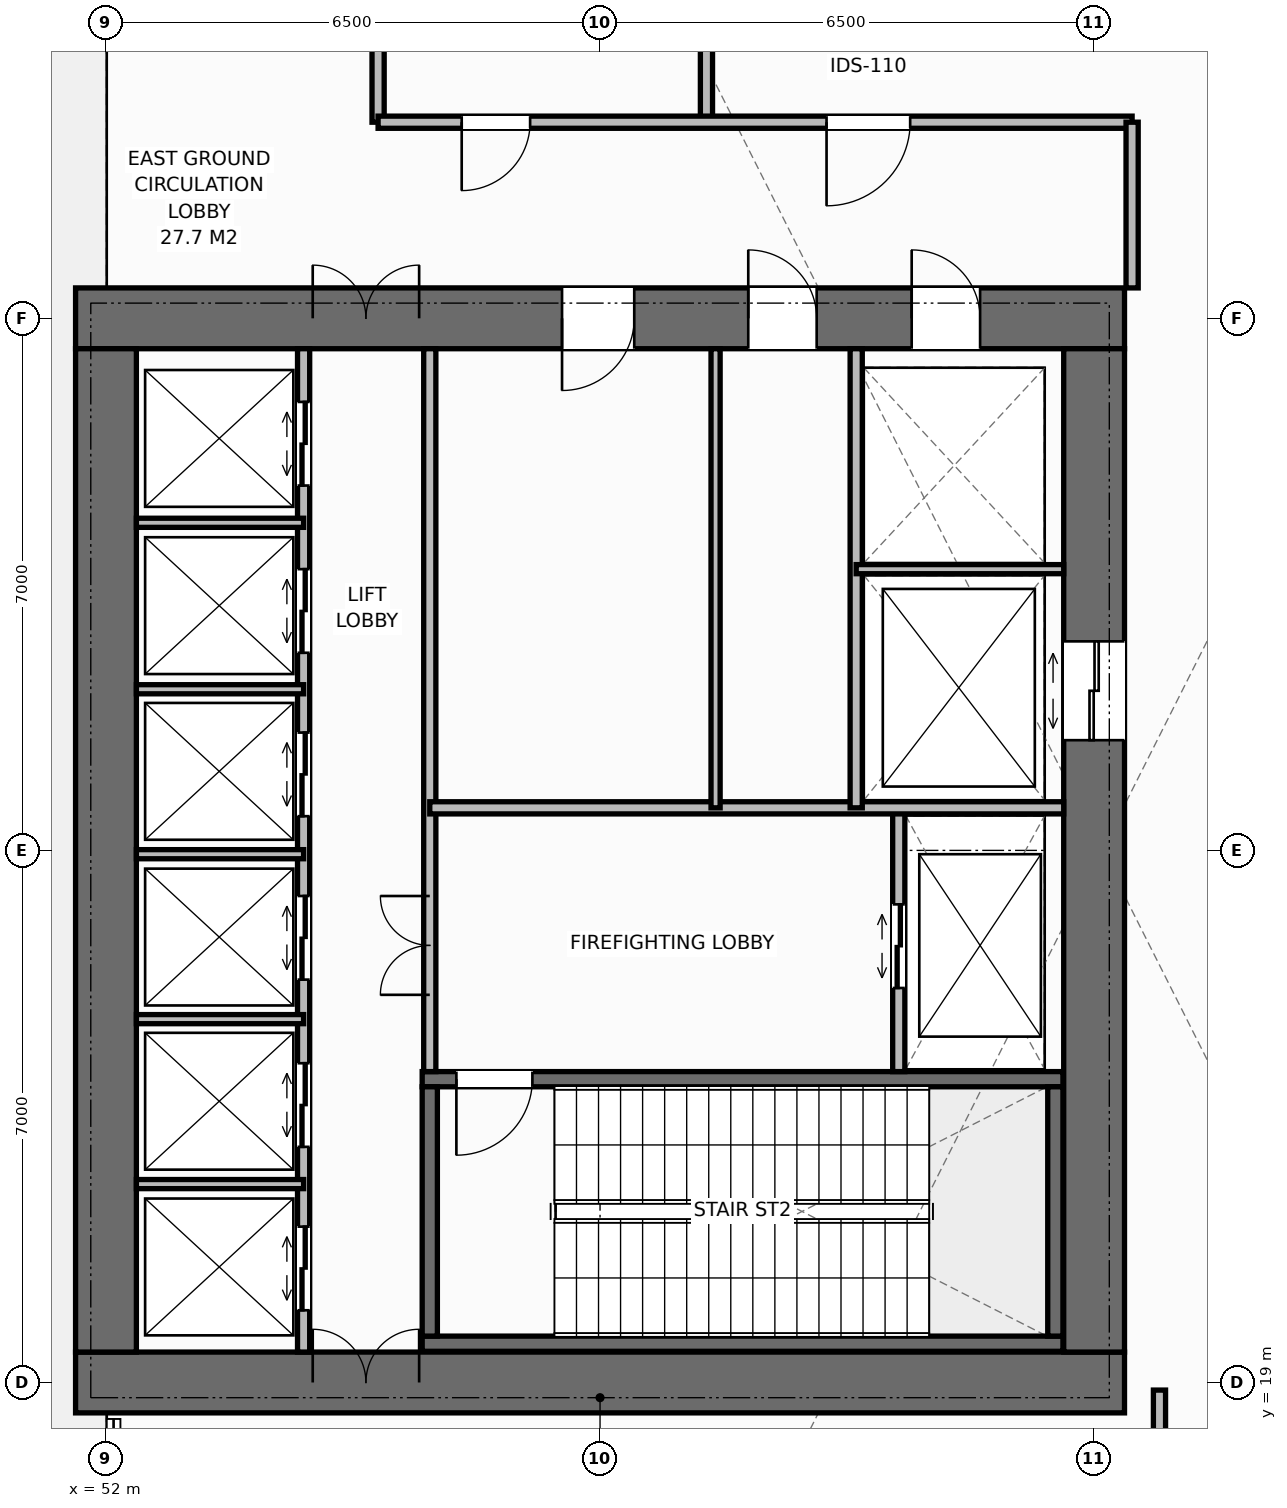
"""IFC4 building model, lengths in metres.
Left out: names, types, materials, properties, quantities, classifications, styles, units other than length and angle.
Written with IfcOpenShell. Run it as: python <this file> out.ifc"""

import sys

from ifc_helpers import new_model, si_unit, direction, frame, frame_2d, origin, place, context, subcontext, project, spatial, rectangle, extrude, element, fill, save


model = new_model("IFC4")
c1 = context("Model", 3, precision=1e-05, world=origin(), true_north=direction((0.0, 1.0)))
c2 = subcontext(c1, "Body", "Model", "MODEL_VIEW")
j1 = project(units=[si_unit("LENGTHUNIT", "METRE"), si_unit("PLANEANGLEUNIT", "RADIAN")], contexts=[c1])
p1 = place(None, origin())
s1 = spatial("IfcSite", under=j1, at=p1, CompositionType="ELEMENT")
p2 = place(p1, origin())
s2 = spatial("IfcBuilding", under=s1, at=p2, CompositionType="ELEMENT")
p3 = place(p2, origin())
s3 = spatial("IfcBuildingStorey", under=s2, at=p3, CompositionType="ELEMENT", Elevation=0.0)
p4 = place(p3, frame((51.6, 19.0, 0.0), z_axis=(0.0, 0.0, 1.0), x_axis=(1.0, 0.0, 0.0)))
e1 = element("IfcWall", 1, at=p4, inside=s3, PredefinedType="SHEAR", context=c2, shape_type="SweptSolid", body=[
    extrude(rectangle(XDim=13.8, YDim=0.8, at=frame_2d((6.9, 0.0))), origin(), (0.0, 0.0, 1.0), 6.0),
])
p5 = place(p4, frame((3.12, 0.0, 0.0)))
e2 = element("IfcOpeningElement", 2, at=p5, cuts=e1, PredefinedType="OPENING", context=c2, shape_type="SweptSolid", body=[
    extrude(rectangle(XDim=1.4, YDim=2.2, at=frame_2d((0.7, 1.1))), frame((0.0, 0.41, 0.0), z_axis=(0.0, -1.0, 0.0), x_axis=(1.0, 0.0, 0.0)), (0.0, 0.0, 1.0), 0.82),
])
p6 = place(p3, frame((51.6, 33.0, 0.0), z_axis=(0.0, 0.0, 1.0), x_axis=(1.0, 0.0, 0.0)))
e3 = element("IfcWall", 3, at=p6, inside=s3, PredefinedType="SHEAR", context=c2, shape_type="SweptSolid", body=[
    extrude(rectangle(XDim=13.8, YDim=0.8, at=frame_2d((6.9, 0.0))), origin(), (0.0, 0.0, 1.0), 6.0),
])
p7 = place(p6, frame((3.12, 0.0, 0.0)))
e4 = element("IfcOpeningElement", 4, at=p7, cuts=e3, PredefinedType="OPENING", context=c2, shape_type="SweptSolid", body=[
    extrude(rectangle(XDim=1.4, YDim=2.2, at=frame_2d((0.7, 1.1))), frame((0.0, 0.41, 0.0), z_axis=(0.0, -1.0, 0.0), x_axis=(1.0, 0.0, 0.0)), (0.0, 0.0, 1.0), 0.82),
])
p8 = place(p6, frame((11.0, 0.0, 0.0)))
e5 = element("IfcOpeningElement", 5, at=p8, cuts=e3, PredefinedType="OPENING", context=c2, shape_type="SweptSolid", body=[
    extrude(rectangle(XDim=0.9, YDim=2.15, at=frame_2d((0.45, 1.075))), frame((0.0, 0.41, 0.0), z_axis=(0.0, -1.0, 0.0), x_axis=(1.0, 0.0, 0.0)), (0.0, 0.0, 1.0), 0.82),
])
p9 = place(p6, frame((6.4, 0.0, 0.0)))
e6 = element("IfcOpeningElement", 6, at=p9, cuts=e3, PredefinedType="OPENING", context=c2, shape_type="SweptSolid", body=[
    extrude(rectangle(XDim=0.95, YDim=2.15, at=frame_2d((0.475, 1.075))), frame((0.0, 0.41, 0.0), z_axis=(0.0, -1.0, 0.0), x_axis=(1.0, 0.0, 0.0)), (0.0, 0.0, 1.0), 0.82),
])
p10 = place(p6, frame((8.85, 0.0, 0.0)))
e7 = element("IfcOpeningElement", 7, at=p10, cuts=e3, PredefinedType="OPENING", context=c2, shape_type="SweptSolid", body=[
    extrude(rectangle(XDim=0.9, YDim=2.15, at=frame_2d((0.45, 1.075))), frame((0.0, 0.41, 0.0), z_axis=(0.0, -1.0, 0.0), x_axis=(1.0, 0.0, 0.0)), (0.0, 0.0, 1.0), 0.82),
])
p11 = place(p3, frame((52.0, 19.4, 0.0), z_axis=(0.0, 0.0, 1.0), x_axis=(0.0, 1.0, 0.0)))
e8 = element("IfcWall", 8, at=p11, inside=s3, PredefinedType="SHEAR", context=c2, shape_type="SweptSolid", body=[
    extrude(rectangle(XDim=13.2, YDim=0.8, at=frame_2d((6.6, 0.0))), origin(), (0.0, 0.0, 1.0), 6.0),
])
p12 = place(p3, frame((65.0, 19.4, 0.0), z_axis=(0.0, 0.0, 1.0), x_axis=(0.0, 1.0, 0.0)))
e9 = element("IfcWall", 9, at=p12, inside=s3, PredefinedType="SHEAR", context=c2, shape_type="SweptSolid", body=[
    extrude(rectangle(XDim=13.2, YDim=0.8, at=frame_2d((6.6, 0.0))), origin(), (0.0, 0.0, 1.0), 6.0),
])
p13 = place(p12, frame((8.05, 0.0, 0.0)))
e10 = element("IfcOpeningElement", 10, at=p13, cuts=e9, PredefinedType="OPENING", context=c2, shape_type="SweptSolid", body=[
    extrude(rectangle(XDim=1.3, YDim=2.2, at=frame_2d((0.65, 1.1))), frame((0.0, 0.41, 0.0), z_axis=(0.0, -1.0, 0.0), x_axis=(1.0, 0.0, 0.0)), (0.0, 0.0, 1.0), 0.82),
])
p14 = place(p3, frame((56.16, 19.51, 0.0), z_axis=(0.0, 0.0, 1.0), x_axis=(1.0, 0.0, 0.0)))
e11 = element("IfcWall", 11, at=p14, inside=s3, PredefinedType="SHEAR", context=c2, shape_type="SweptSolid", body=[
    extrude(rectangle(XDim=8.43, YDim=0.2, at=frame_2d((4.215, 0.0))), origin(), (0.0, 0.0, 1.0), 6.0),
])
p15 = place(p3, frame((56.16, 22.99, 0.0), z_axis=(0.0, 0.0, 1.0), x_axis=(1.0, 0.0, 0.0)))
e12 = element("IfcWall", 12, at=p15, inside=s3, PredefinedType="SHEAR", context=c2, shape_type="SweptSolid", body=[
    extrude(rectangle(XDim=8.43, YDim=0.2, at=frame_2d((4.215, 0.0))), origin(), (0.0, 0.0, 1.0), 6.0),
])
p16 = place(p15, frame((0.45, 0.0, 0.0)))
e13 = element("IfcOpeningElement", 13, at=p16, cuts=e12, PredefinedType="OPENING", context=c2, shape_type="SweptSolid", body=[
    extrude(rectangle(XDim=1.0, YDim=2.15, at=frame_2d((0.5, 1.075))), frame((0.0, 0.11, 0.0), z_axis=(0.0, -1.0, 0.0), x_axis=(1.0, 0.0, 0.0)), (0.0, 0.0, 1.0), 0.22),
])
for number, where, z_axis, x_axis in (
    (14, (56.26, 19.61, 0.0), (0.0, 0.0, 1.0), (0.0, 1.0, 0.0)),
    (15, (64.49, 19.61, 0.0), (0.0, 0.0, 1.0), (0.0, 1.0, 0.0)),
):
    element("IfcWall", number, at=place(p3, frame(where, z_axis=z_axis, x_axis=x_axis)), inside=s3, PredefinedType="SHEAR", context=c2, shape_type="SweptSolid", body=[
        extrude(rectangle(XDim=3.28, YDim=0.2, at=frame_2d((1.64, 0.0))), origin(), (0.0, 0.0, 1.0), 6.0),
    ])
p17 = place(p3, frame((54.6, 19.4, 0.0), z_axis=(0.0, 0.0, 1.0), x_axis=(0.0, 1.0, 0.0)))
e16 = element("IfcWall", 16, at=p17, inside=s3, PredefinedType="STANDARD", context=c2, shape_type="SweptSolid", body=[
    extrude(rectangle(XDim=13.2, YDim=0.16, at=frame_2d((6.6, 0.0))), origin(), (0.0, 0.0, 1.0), 5.72),
])
p18 = place(p17, frame((0.55, 0.0, 0.0)))
e17 = element("IfcOpeningElement", 17, at=p18, cuts=e16, PredefinedType="OPENING", context=c2, shape_type="SweptSolid", body=[
    extrude(rectangle(XDim=1.1, YDim=2.2, at=frame_2d((0.55, 1.1))), frame((0.0, 0.09, 0.0), z_axis=(0.0, -1.0, 0.0), x_axis=(1.0, 0.0, 0.0)), (0.0, 0.0, 1.0), 0.18),
])
p19 = place(p17, frame((2.7, 0.0, 0.0)))
e18 = element("IfcOpeningElement", 18, at=p19, cuts=e16, PredefinedType="OPENING", context=c2, shape_type="SweptSolid", body=[
    extrude(rectangle(XDim=1.1, YDim=2.2, at=frame_2d((0.55, 1.1))), frame((0.0, 0.09, 0.0), z_axis=(0.0, -1.0, 0.0), x_axis=(1.0, 0.0, 0.0)), (0.0, 0.0, 1.0), 0.18),
])
p20 = place(p17, frame((4.9, 0.0, 0.0)))
e19 = element("IfcOpeningElement", 19, at=p20, cuts=e16, PredefinedType="OPENING", context=c2, shape_type="SweptSolid", body=[
    extrude(rectangle(XDim=1.1, YDim=2.2, at=frame_2d((0.55, 1.1))), frame((0.0, 0.09, 0.0), z_axis=(0.0, -1.0, 0.0), x_axis=(1.0, 0.0, 0.0)), (0.0, 0.0, 1.0), 0.18),
])
p21 = place(p17, frame((7.05, 0.0, 0.0)))
e20 = element("IfcOpeningElement", 20, at=p21, cuts=e16, PredefinedType="OPENING", context=c2, shape_type="SweptSolid", body=[
    extrude(rectangle(XDim=1.1, YDim=2.2, at=frame_2d((0.55, 1.1))), frame((0.0, 0.09, 0.0), z_axis=(0.0, -1.0, 0.0), x_axis=(1.0, 0.0, 0.0)), (0.0, 0.0, 1.0), 0.18),
])
p22 = place(p17, frame((9.2, 0.0, 0.0)))
e21 = element("IfcOpeningElement", 21, at=p22, cuts=e16, PredefinedType="OPENING", context=c2, shape_type="SweptSolid", body=[
    extrude(rectangle(XDim=1.1, YDim=2.2, at=frame_2d((0.55, 1.1))), frame((0.0, 0.09, 0.0), z_axis=(0.0, -1.0, 0.0), x_axis=(1.0, 0.0, 0.0)), (0.0, 0.0, 1.0), 0.18),
])
p23 = place(p17, frame((11.4, 0.0, 0.0)))
e22 = element("IfcOpeningElement", 22, at=p23, cuts=e16, PredefinedType="OPENING", context=c2, shape_type="SweptSolid", body=[
    extrude(rectangle(XDim=1.1, YDim=2.2, at=frame_2d((0.55, 1.1))), frame((0.0, 0.09, 0.0), z_axis=(0.0, -1.0, 0.0), x_axis=(1.0, 0.0, 0.0)), (0.0, 0.0, 1.0), 0.18),
])
p24 = place(p3, frame((56.26, 23.09, 0.0), z_axis=(0.0, 0.0, 1.0), x_axis=(0.0, 1.0, 0.0)))
e23 = element("IfcWall", 23, at=p24, inside=s3, PredefinedType="STANDARD", context=c2, shape_type="SweptSolid", body=[
    extrude(rectangle(XDim=9.51, YDim=0.16, at=frame_2d((4.755, 0.0))), origin(), (0.0, 0.0, 1.0), 5.72),
])
p25 = place(p24, frame((1.01, 0.0, 0.0)))
e24 = element("IfcOpeningElement", 24, at=p25, cuts=e23, PredefinedType="OPENING", context=c2, shape_type="SweptSolid", body=[
    extrude(rectangle(XDim=1.3, YDim=2.2, at=frame_2d((0.65, 1.1))), frame((0.0, 0.09, 0.0), z_axis=(0.0, -1.0, 0.0), x_axis=(1.0, 0.0, 0.0)), (0.0, 0.0, 1.0), 0.18),
])
for number, where, z_axis, x_axis in (
    (25, (52.4, 21.61, 0.0), (0.0, 0.0, 1.0), (1.0, 0.0, 0.0)),
    (26, (52.4, 23.78, 0.0), (0.0, 0.0, 1.0), (1.0, 0.0, 0.0)),
    (27, (52.4, 25.95, 0.0), (0.0, 0.0, 1.0), (1.0, 0.0, 0.0)),
    (28, (52.4, 28.12, 0.0), (0.0, 0.0, 1.0), (1.0, 0.0, 0.0)),
    (29, (52.4, 30.31, 0.0), (0.0, 0.0, 1.0), (1.0, 0.0, 0.0)),
):
    element("IfcWall", number, at=place(p3, frame(where, z_axis=z_axis, x_axis=x_axis)), inside=s3, PredefinedType="PARTITIONING", context=c2, shape_type="SweptSolid", body=[
        extrude(rectangle(XDim=2.2, YDim=0.12, at=frame_2d((1.1, 0.0))), origin(), (0.0, 0.0, 1.0), 5.72),
    ])
p26 = place(p3, frame((62.43, 23.09, 0.0), z_axis=(0.0, 0.0, 1.0), x_axis=(0.0, 1.0, 0.0)))
e30 = element("IfcWall", 30, at=p26, inside=s3, PredefinedType="STANDARD", context=c2, shape_type="SweptSolid", body=[
    extrude(rectangle(XDim=3.47, YDim=0.16, at=frame_2d((1.735, 0.0))), origin(), (0.0, 0.0, 1.0), 5.72),
])
p27 = place(p26, frame((1.1, 0.0, 0.0)))
e31 = element("IfcOpeningElement", 31, at=p27, cuts=e30, PredefinedType="OPENING", context=c2, shape_type="SweptSolid", body=[
    extrude(rectangle(XDim=1.1, YDim=2.2, at=frame_2d((0.55, 1.1))), frame((0.0, 0.09, 0.0), z_axis=(0.0, -1.0, 0.0), x_axis=(1.0, 0.0, 0.0)), (0.0, 0.0, 1.0), 0.18),
])
p28 = place(p3, frame((56.26, 26.56, 0.0), z_axis=(0.0, 0.0, 1.0), x_axis=(1.0, 0.0, 0.0)))
e32 = element("IfcWall", 32, at=p28, inside=s3, PredefinedType="STANDARD", context=c2, shape_type="SweptSolid", body=[
    extrude(rectangle(XDim=8.34, YDim=0.16, at=frame_2d((4.17, 0.0))), origin(), (0.0, 0.0, 1.0), 5.72),
])
p29 = place(p3, frame((61.87, 26.56, 0.0), z_axis=(0.0, 0.0, 1.0), x_axis=(0.0, 1.0, 0.0)))
e33 = element("IfcWall", 33, at=p29, inside=s3, PredefinedType="STANDARD", context=c2, shape_type="SweptSolid", body=[
    extrude(rectangle(XDim=6.04, YDim=0.16, at=frame_2d((3.02, 0.0))), origin(), (0.0, 0.0, 1.0), 5.72),
])
p30 = place(p3, frame((61.87, 29.7, 0.0), z_axis=(0.0, 0.0, 1.0), x_axis=(1.0, 0.0, 0.0)))
e34 = element("IfcWall", 34, at=p30, inside=s3, PredefinedType="PARTITIONING", context=c2, shape_type="SweptSolid", body=[
    extrude(rectangle(XDim=2.73, YDim=0.12, at=frame_2d((1.365, 0.0))), origin(), (0.0, 0.0, 1.0), 5.72),
])
p31 = place(p3, frame((60.02, 26.56, 0.0), z_axis=(0.0, 0.0, 1.0), x_axis=(0.0, 1.0, 0.0)))
e35 = element("IfcWall", 35, at=p31, inside=s3, PredefinedType="PARTITIONING", context=c2, shape_type="SweptSolid", body=[
    extrude(rectangle(XDim=6.04, YDim=0.12, at=frame_2d((3.02, 0.0))), origin(), (0.0, 0.0, 1.0), 5.72),
])
for number, where, z_axis, x_axis in (
    (36, (55.58, 35.58, 0.0), (0.0, 0.0, 1.0), (0.0, 1.0, 0.0)),
    (37, (59.9, 35.58, 0.0), (0.0, 0.0, 1.0), (0.0, 1.0, 0.0)),
):
    element("IfcWall", number, at=place(p3, frame(where, z_axis=z_axis, x_axis=x_axis)), inside=s3, PredefinedType="STANDARD", context=c2, shape_type="SweptSolid", body=[
        extrude(rectangle(XDim=4.48, YDim=0.16, at=frame_2d((2.24, 0.0))), origin(), (0.0, 0.0, 1.0), 5.72),
    ])
p32 = place(p3, frame((55.58, 35.58, 0.0), z_axis=(0.0, 0.0, 1.0), x_axis=(1.0, 0.0, 0.0)))
e38 = element("IfcWall", 38, at=p32, inside=s3, PredefinedType="STANDARD", context=c2, shape_type="SweptSolid", body=[
    extrude(rectangle(XDim=9.92, YDim=0.16, at=frame_2d((4.96, 0.0))), origin(), (0.0, 0.0, 1.0), 5.72),
])
p33 = place(p32, frame((1.1, 0.0, 0.0)))
e39 = element("IfcOpeningElement", 39, at=p33, cuts=e38, PredefinedType="OPENING", context=c2, shape_type="SweptSolid", body=[
    extrude(rectangle(XDim=0.9, YDim=2.15, at=frame_2d((0.45, 1.075))), frame((0.0, 0.09, 0.0), z_axis=(0.0, -1.0, 0.0), x_axis=(1.0, 0.0, 0.0)), (0.0, 0.0, 1.0), 0.18),
])
p34 = place(p32, frame((5.9, 0.0, 0.0)))
e40 = element("IfcOpeningElement", 40, at=p34, cuts=e38, PredefinedType="OPENING", context=c2, shape_type="SweptSolid", body=[
    extrude(rectangle(XDim=1.1, YDim=2.15, at=frame_2d((0.55, 1.075))), frame((0.0, 0.09, 0.0), z_axis=(0.0, -1.0, 0.0), x_axis=(1.0, 0.0, 0.0)), (0.0, 0.0, 1.0), 0.18),
])
p35 = place(p3, frame((65.5, 33.4, 0.0), z_axis=(0.0, 0.0, 1.0), x_axis=(0.0, 1.0, 0.0)))
e41 = element("IfcWall", 41, at=p35, inside=s3, PredefinedType="STANDARD", context=c2, shape_type="SweptSolid", body=[
    extrude(rectangle(XDim=2.18, YDim=0.16, at=frame_2d((1.09, 0.0))), origin(), (0.0, 0.0, 1.0), 5.72),
])
p36 = place(p3, frame((65.86, 10.19, 0.0), z_axis=(0.0, 0.0, 1.0), x_axis=(0.0, 1.0, 0.0)))
e42 = element("IfcWall", 42, at=p36, inside=s3, PredefinedType="STANDARD", context=c2, shape_type="SweptSolid", body=[
    extrude(rectangle(XDim=8.71, YDim=0.16, at=frame_2d((4.355, 0.0))), origin(), (0.0, 0.0, 1.0), 5.72),
])
p37 = place(p36, frame((3.2, 0.0, 0.0)))
e43 = element("IfcOpeningElement", 43, at=p37, cuts=e42, PredefinedType="OPENING", context=c2, shape_type="SweptSolid", body=[
    extrude(rectangle(XDim=1.4, YDim=2.2, at=frame_2d((0.7, 1.1))), frame((0.0, 0.09, 0.0), z_axis=(0.0, -1.0, 0.0), x_axis=(1.0, 0.0, 0.0)), (0.0, 0.0, 1.0), 0.18),
])
p38 = place(p5, origin())
e44 = element("IfcDoor", 44, at=p38, inside=s3, OperationType="DOUBLE_DOOR_SINGLE_SWING", PredefinedType="DOOR", context=c2, shape_type="SweptSolid", body=[
    extrude(rectangle(XDim=1.4, YDim=2.2, at=frame_2d((0.7, 1.1))), frame((0.0, 0.125, 0.0), z_axis=(0.0, -1.0, 0.0), x_axis=(1.0, 0.0, 0.0)), (0.0, 0.0, 1.0), 0.05),
])
fill(e2, e44)
p39 = place(p7, origin())
e45 = element("IfcDoor", 45, at=p39, inside=s3, OperationType="DOUBLE_DOOR_SINGLE_SWING", PredefinedType="DOOR", context=c2, shape_type="SweptSolid", body=[
    extrude(rectangle(XDim=1.4, YDim=2.2, at=frame_2d((0.7, 1.1))), frame((0.0, -0.075, 0.0), z_axis=(0.0, -1.0, 0.0), x_axis=(1.0, 0.0, 0.0)), (0.0, 0.0, 1.0), 0.05),
])
fill(e4, e45)
p40 = place(p18, origin())
e46 = element("IfcDoor", 46, at=p40, inside=s3, OperationType="DOUBLE_DOOR_SLIDING", PredefinedType="DOOR", context=c2, shape_type="SweptSolid", body=[
    extrude(rectangle(XDim=1.1, YDim=2.2, at=frame_2d((0.55, 1.1))), frame((0.0, 0.025, 0.0), z_axis=(0.0, -1.0, 0.0), x_axis=(1.0, 0.0, 0.0)), (0.0, 0.0, 1.0), 0.05),
])
fill(e17, e46)
p41 = place(p19, origin())
e47 = element("IfcDoor", 47, at=p41, inside=s3, OperationType="DOUBLE_DOOR_SLIDING", PredefinedType="DOOR", context=c2, shape_type="SweptSolid", body=[
    extrude(rectangle(XDim=1.1, YDim=2.2, at=frame_2d((0.55, 1.1))), frame((0.0, 0.025, 0.0), z_axis=(0.0, -1.0, 0.0), x_axis=(1.0, 0.0, 0.0)), (0.0, 0.0, 1.0), 0.05),
])
fill(e18, e47)
p42 = place(p20, origin())
e48 = element("IfcDoor", 48, at=p42, inside=s3, OperationType="DOUBLE_DOOR_SLIDING", PredefinedType="DOOR", context=c2, shape_type="SweptSolid", body=[
    extrude(rectangle(XDim=1.1, YDim=2.2, at=frame_2d((0.55, 1.1))), frame((0.0, 0.025, 0.0), z_axis=(0.0, -1.0, 0.0), x_axis=(1.0, 0.0, 0.0)), (0.0, 0.0, 1.0), 0.05),
])
fill(e19, e48)
p43 = place(p21, origin())
e49 = element("IfcDoor", 49, at=p43, inside=s3, OperationType="DOUBLE_DOOR_SLIDING", PredefinedType="DOOR", context=c2, shape_type="SweptSolid", body=[
    extrude(rectangle(XDim=1.1, YDim=2.2, at=frame_2d((0.55, 1.1))), frame((0.0, 0.025, 0.0), z_axis=(0.0, -1.0, 0.0), x_axis=(1.0, 0.0, 0.0)), (0.0, 0.0, 1.0), 0.05),
])
fill(e20, e49)
p44 = place(p22, origin())
e50 = element("IfcDoor", 50, at=p44, inside=s3, OperationType="DOUBLE_DOOR_SLIDING", PredefinedType="DOOR", context=c2, shape_type="SweptSolid", body=[
    extrude(rectangle(XDim=1.1, YDim=2.2, at=frame_2d((0.55, 1.1))), frame((0.0, 0.025, 0.0), z_axis=(0.0, -1.0, 0.0), x_axis=(1.0, 0.0, 0.0)), (0.0, 0.0, 1.0), 0.05),
])
fill(e21, e50)
p45 = place(p23, origin())
e51 = element("IfcDoor", 51, at=p45, inside=s3, OperationType="DOUBLE_DOOR_SLIDING", PredefinedType="DOOR", context=c2, shape_type="SweptSolid", body=[
    extrude(rectangle(XDim=1.1, YDim=2.2, at=frame_2d((0.55, 1.1))), frame((0.0, 0.025, 0.0), z_axis=(0.0, -1.0, 0.0), x_axis=(1.0, 0.0, 0.0)), (0.0, 0.0, 1.0), 0.05),
])
fill(e22, e51)
p46 = place(p16, origin())
e52 = element("IfcDoor", 52, at=p46, inside=s3, OperationType="SINGLE_SWING_RIGHT", PredefinedType="DOOR", context=c2, shape_type="SweptSolid", body=[
    extrude(rectangle(XDim=1.0, YDim=2.15, at=frame_2d((0.5, 1.075))), frame((0.0, 0.025, 0.0), z_axis=(0.0, -1.0, 0.0), x_axis=(1.0, 0.0, 0.0)), (0.0, 0.0, 1.0), 0.05),
])
fill(e13, e52)
p47 = place(p27, origin())
e53 = element("IfcDoor", 53, at=p47, inside=s3, OperationType="DOUBLE_DOOR_SLIDING", PredefinedType="DOOR", context=c2, shape_type="SweptSolid", body=[
    extrude(rectangle(XDim=1.1, YDim=2.2, at=frame_2d((0.55, 1.1))), frame((0.0, 0.025, 0.0), z_axis=(0.0, -1.0, 0.0), x_axis=(1.0, 0.0, 0.0)), (0.0, 0.0, 1.0), 0.05),
])
fill(e31, e53)
p48 = place(p25, origin())
e54 = element("IfcDoor", 54, at=p48, inside=s3, OperationType="DOUBLE_DOOR_SINGLE_SWING", PredefinedType="DOOR", context=c2, shape_type="SweptSolid", body=[
    extrude(rectangle(XDim=1.3, YDim=2.2, at=frame_2d((0.65, 1.1))), frame((0.0, 0.025, 0.0), z_axis=(0.0, -1.0, 0.0), x_axis=(1.0, 0.0, 0.0)), (0.0, 0.0, 1.0), 0.05),
])
fill(e24, e54)
p49 = place(p13, origin())
e55 = element("IfcDoor", 55, at=p49, inside=s3, OperationType="DOUBLE_DOOR_SLIDING", PredefinedType="DOOR", context=c2, shape_type="SweptSolid", body=[
    extrude(rectangle(XDim=1.3, YDim=2.2, at=frame_2d((0.65, 1.1))), frame((0.0, 0.025, 0.0), z_axis=(0.0, -1.0, 0.0), x_axis=(1.0, 0.0, 0.0)), (0.0, 0.0, 1.0), 0.05),
])
fill(e10, e55)
p50 = place(p8, origin())
e56 = element("IfcDoor", 56, at=p50, inside=s3, OperationType="SINGLE_SWING_LEFT", PredefinedType="DOOR", context=c2, shape_type="SweptSolid", body=[
    extrude(rectangle(XDim=0.9, YDim=2.15, at=frame_2d((0.45, 1.075))), frame((0.0, -0.075, 0.0), z_axis=(0.0, -1.0, 0.0), x_axis=(1.0, 0.0, 0.0)), (0.0, 0.0, 1.0), 0.05),
])
fill(e5, e56)
p51 = place(p9, origin())
e57 = element("IfcDoor", 57, at=p51, inside=s3, OperationType="SINGLE_SWING_RIGHT", PredefinedType="DOOR", context=c2, shape_type="SweptSolid", body=[
    extrude(rectangle(XDim=0.95, YDim=2.15, at=frame_2d((0.475, 1.075))), frame((0.0, -0.075, 0.0), z_axis=(0.0, -1.0, 0.0), x_axis=(1.0, 0.0, 0.0)), (0.0, 0.0, 1.0), 0.05),
])
fill(e6, e57)
p52 = place(p10, origin())
e58 = element("IfcDoor", 58, at=p52, inside=s3, OperationType="SINGLE_SWING_LEFT", PredefinedType="DOOR", context=c2, shape_type="SweptSolid", body=[
    extrude(rectangle(XDim=0.9, YDim=2.15, at=frame_2d((0.45, 1.075))), frame((0.0, -0.075, 0.0), z_axis=(0.0, -1.0, 0.0), x_axis=(1.0, 0.0, 0.0)), (0.0, 0.0, 1.0), 0.05),
])
fill(e7, e58)
p53 = place(p33, origin())
e59 = element("IfcDoor", 59, at=p53, inside=s3, OperationType="SINGLE_SWING_RIGHT", PredefinedType="DOOR", context=c2, shape_type="SweptSolid", body=[
    extrude(rectangle(XDim=0.9, YDim=2.15, at=frame_2d((0.45, 1.075))), frame((0.0, 0.025, 0.0), z_axis=(0.0, -1.0, 0.0), x_axis=(1.0, 0.0, 0.0)), (0.0, 0.0, 1.0), 0.05),
])
fill(e39, e59)
p54 = place(p34, origin())
e60 = element("IfcDoor", 60, at=p54, inside=s3, OperationType="SINGLE_SWING_RIGHT", PredefinedType="DOOR", context=c2, shape_type="SweptSolid", body=[
    extrude(rectangle(XDim=1.1, YDim=2.15, at=frame_2d((0.55, 1.075))), frame((0.0, 0.025, 0.0), z_axis=(0.0, -1.0, 0.0), x_axis=(1.0, 0.0, 0.0)), (0.0, 0.0, 1.0), 0.05),
])
fill(e40, e60)
save(model, sys.argv[1])
